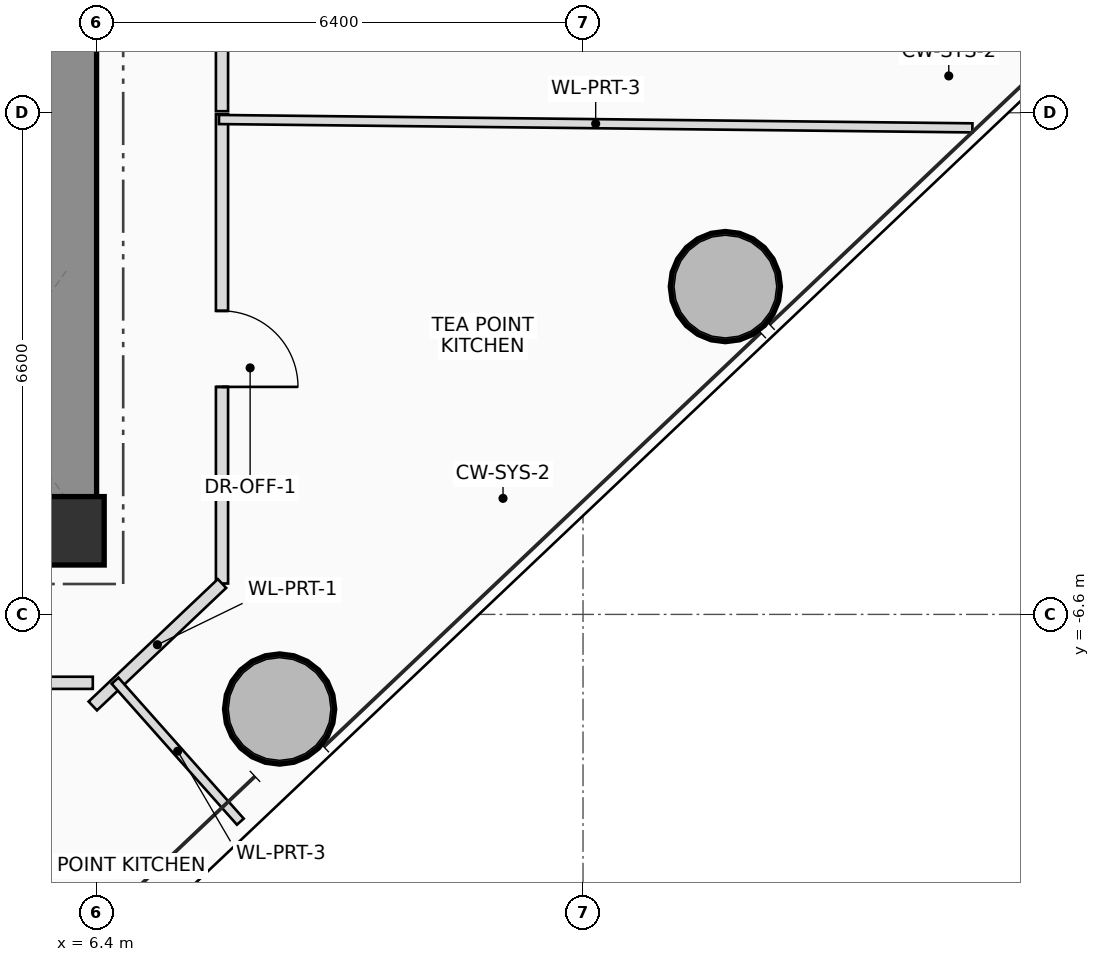
"""IFC4 building model, lengths in metres.
Left out: names, types, materials, properties, quantities, classifications, styles, units other than length and angle.
Written with IfcOpenShell. Run it as: python <this file> out.ifc"""

import sys

from ifc_helpers import new_model, si_unit, direction, frame, frame_2d, origin, origin_2d, place, context, subcontext, project, spatial, rectangle, hollow_circle, extrude, source, transform, mapped, element, fill, save


model = new_model("IFC4")
c1 = context("Model", 3, precision=1e-05, world=origin(), true_north=direction((0.0, 1.0)))
c2 = subcontext(c1, "Body", "Model", "MODEL_VIEW")
j1 = project(units=[si_unit("LENGTHUNIT", "METRE"), si_unit("PLANEANGLEUNIT", "RADIAN")], contexts=[c1])
p1 = place(None, origin())
s1 = spatial("IfcSite", under=j1, at=p1, CompositionType="ELEMENT")
p2 = place(p1, origin())
s2 = spatial("IfcBuilding", under=s1, at=p2, CompositionType="ELEMENT")
p3 = place(p2, frame((0.0, 0.0, 89.9)))
s3 = spatial("IfcBuildingStorey", under=s2, at=p3, CompositionType="ELEMENT", Elevation=89.9)
m1 = source(origin(), c2, "Body", "SweptSolid", [
    extrude(rectangle(XDim=0.9, YDim=0.9, at=origin_2d()), origin(), (0.0, 0.0, 1.0), 3.75),
])
p4 = place(p3, frame((6.05, -5.5, 0.0), z_axis=(0.0, 0.0, 1.0), x_axis=(1.0, 0.0, 0.0)))
e1 = element("IfcColumn", 1, at=p4, inside=s3, PredefinedType="COLUMN", context=c2, shape_type="MappedRepresentation", body=[
    mapped(m1, transform((0.0, 0.0, 0.0), scale=1.0)),
])
p5 = place(p3, frame((-6.4, -5.475, 0.0), z_axis=(0.0, 0.0, 1.0), x_axis=(1.0, 0.0, 0.0)))
e2 = element("IfcWall", 2, at=p5, inside=s3, PredefinedType="SHEAR", context=c2, shape_type="SweptSolid", body=[
    extrude(rectangle(XDim=12.8, YDim=0.75, at=frame_2d((6.4, 0.0))), origin(), (0.0, 0.0, 1.0), 3.75),
])
p6 = place(p5, frame((8.6, 0.0, 0.0)))
e3 = element("IfcOpeningElement", 3, at=p6, cuts=e2, PredefinedType="OPENING", context=c2, shape_type="SweptSolid", body=[
    extrude(rectangle(XDim=1.2, YDim=2.2, at=frame_2d((0.6, 1.1))), frame((0.0, 0.385, 0.0), z_axis=(0.0, -1.0, 0.0), x_axis=(1.0, 0.0, 0.0)), (0.0, 0.0, 1.0), 0.77),
])
p7 = place(p3, frame((6.025, -5.1, 0.0), z_axis=(0.0, 0.0, 1.0), x_axis=(0.0, 1.0, 0.0)))
e4 = element("IfcWall", 4, at=p7, inside=s3, PredefinedType="SHEAR", context=c2, shape_type="SweptSolid", body=[
    extrude(rectangle(XDim=10.2, YDim=0.75, at=frame_2d((5.1, 0.0))), origin(), (0.0, 0.0, 1.0), 3.75),
])
m2 = source(origin(), c2, "Body", "SweptSolid", [
    extrude(hollow_circle(Radius=0.725, WallThickness=0.05, at=origin_2d()), origin(), (0.0, 0.0, 1.0), 3.75),
])
for number, where, z_axis, x_axis in (
    (5, (8.808, -7.845, 0.0), (0.0, 0.0, 1.0), (1.0, 0.0, 0.0)),
    (6, (14.673, -2.287, 0.0), (0.0, 0.0, 1.0), (1.0, 0.0, 0.0)),
):
    element("IfcColumn", number, at=place(p3, frame(where, z_axis=z_axis, x_axis=x_axis)), inside=s3, PredefinedType="COLUMN", context=c2, shape_type="MappedRepresentation", body=[
        mapped(m2, transform((0.0, 0.0, 0.0), scale=1.0)),
    ])
p8 = place(p3, frame((8.05, 7.5, 0.0), z_axis=(0.0, 0.0, 1.0), x_axis=(0.0, -1.0, 0.0)))
e7 = element("IfcWall", 7, at=p8, inside=s3, PredefinedType="PARTITIONING", context=c2, shape_type="SweptSolid", body=[
    extrude(rectangle(XDim=7.48, YDim=0.16, at=frame_2d((3.74, 0.0))), origin(), (0.0, 0.0, 1.0), 2.85),
])
p9 = place(p8, frame((5.491, 0.0, 0.0)))
e8 = element("IfcOpeningElement", 8, at=p9, cuts=e7, PredefinedType="OPENING", context=c2, shape_type="SweptSolid", body=[
    extrude(rectangle(XDim=1.0, YDim=2.25, at=frame_2d((0.5, 1.125))), frame((0.0, 0.09, 0.0), z_axis=(0.0, -1.0, 0.0), x_axis=(1.0, 0.0, 0.0)), (0.0, 0.0, 1.0), 0.18),
])
p10 = place(p3, frame((8.05, -0.02, 0.0), z_axis=(0.0, 0.0, 1.0), x_axis=(0.0, -1.0, 0.0)))
e9 = element("IfcWall", 9, at=p10, inside=s3, PredefinedType="PARTITIONING", context=c2, shape_type="SweptSolid", body=[
    extrude(rectangle(XDim=6.174, YDim=0.16, at=frame_2d((3.087, 0.0))), origin(), (0.0, 0.0, 1.0), 2.85),
])
p11 = place(p10, frame((2.587, 0.0, 0.0)))
e10 = element("IfcOpeningElement", 10, at=p11, cuts=e9, PredefinedType="OPENING", context=c2, shape_type="SweptSolid", body=[
    extrude(rectangle(XDim=1.0, YDim=2.25, at=frame_2d((0.5, 1.125))), frame((0.0, 0.09, 0.0), z_axis=(0.0, -1.0, 0.0), x_axis=(1.0, 0.0, 0.0)), (0.0, 0.0, 1.0), 0.18),
])
p12 = place(p3, frame((8.05, -6.194, 0.0), z_axis=(0.0, 0.0, 1.0), x_axis=(-0.725875977514, -0.687825606726, 0.0)))
e11 = element("IfcWall", 11, at=p12, inside=s3, PredefinedType="PARTITIONING", context=c2, shape_type="SweptSolid", body=[
    extrude(rectangle(XDim=2.342, YDim=0.16, at=frame_2d((1.171, 0.0))), origin(), (0.0, 0.0, 1.0), 2.85),
])
p13 = place(p3, frame((6.35, -7.5, 0.0), z_axis=(0.0, 0.0, 1.0), x_axis=(-1.0, 0.0, 0.0)))
e12 = element("IfcWall", 12, at=p13, inside=s3, PredefinedType="PARTITIONING", context=c2, shape_type="SweptSolid", body=[
    extrude(rectangle(XDim=12.7, YDim=0.16, at=frame_2d((6.35, 0.0))), origin(), (0.0, 0.0, 1.0), 2.85),
])
p14 = place(p13, frame((1.242, 0.0, 0.0)))
e13 = element("IfcOpeningElement", 13, at=p14, cuts=e12, PredefinedType="OPENING", context=c2, shape_type="SweptSolid", body=[
    extrude(rectangle(XDim=1.0, YDim=2.25, at=frame_2d((0.5, 1.125))), frame((0.0, 0.09, 0.0), z_axis=(0.0, -1.0, 0.0), x_axis=(1.0, 0.0, 0.0)), (0.0, 0.0, 1.0), 0.18),
])
p15 = place(p13, frame((5.472, 0.0, 0.0)))
e14 = element("IfcOpeningElement", 14, at=p15, cuts=e12, PredefinedType="OPENING", context=c2, shape_type="SweptSolid", body=[
    extrude(rectangle(XDim=1.0, YDim=2.25, at=frame_2d((0.5, 1.125))), frame((0.0, 0.09, 0.0), z_axis=(0.0, -1.0, 0.0), x_axis=(1.0, 0.0, 0.0)), (0.0, 0.0, 1.0), 0.18),
])
p16 = place(p3, frame((6.643, -7.472, 0.0), z_axis=(0.0, 0.0, 1.0), x_axis=(0.66436383883, -0.747409318684, 0.0)))
e15 = element("IfcWall", 15, at=p16, inside=s3, PredefinedType="PARTITIONING", context=c2, shape_type="SweptSolid", body=[
    extrude(rectangle(XDim=2.481, YDim=0.12, at=frame_2d((1.241, 0.0))), origin(), (0.0, 0.0, 1.0), 3.01),
])
p17 = place(p3, frame((8.01, -0.089, 0.0), z_axis=(0.0, 0.0, 1.0), x_axis=(0.999938319872, -0.011106594972, 0.0)))
e16 = element("IfcWall", 16, at=p17, inside=s3, PredefinedType="PARTITIONING", context=c2, shape_type="SweptSolid", body=[
    extrude(rectangle(XDim=9.914, YDim=0.12, at=frame_2d((4.957, 0.0))), origin(), (0.0, 0.0, 1.0), 2.85),
])
p18 = place(p11, origin())
e17 = element("IfcDoor", 17, at=p18, inside=s3, OperationType="SINGLE_SWING_RIGHT", PredefinedType="DOOR", context=c2, shape_type="SweptSolid", body=[
    extrude(rectangle(XDim=1.0, YDim=2.25, at=frame_2d((0.5, 1.125))), frame((0.0, 0.025, 0.0), z_axis=(0.0, -1.0, 0.0), x_axis=(1.0, 0.0, 0.0)), (0.0, 0.0, 1.0), 0.05),
])
fill(e10, e17)
save(model, sys.argv[1])
